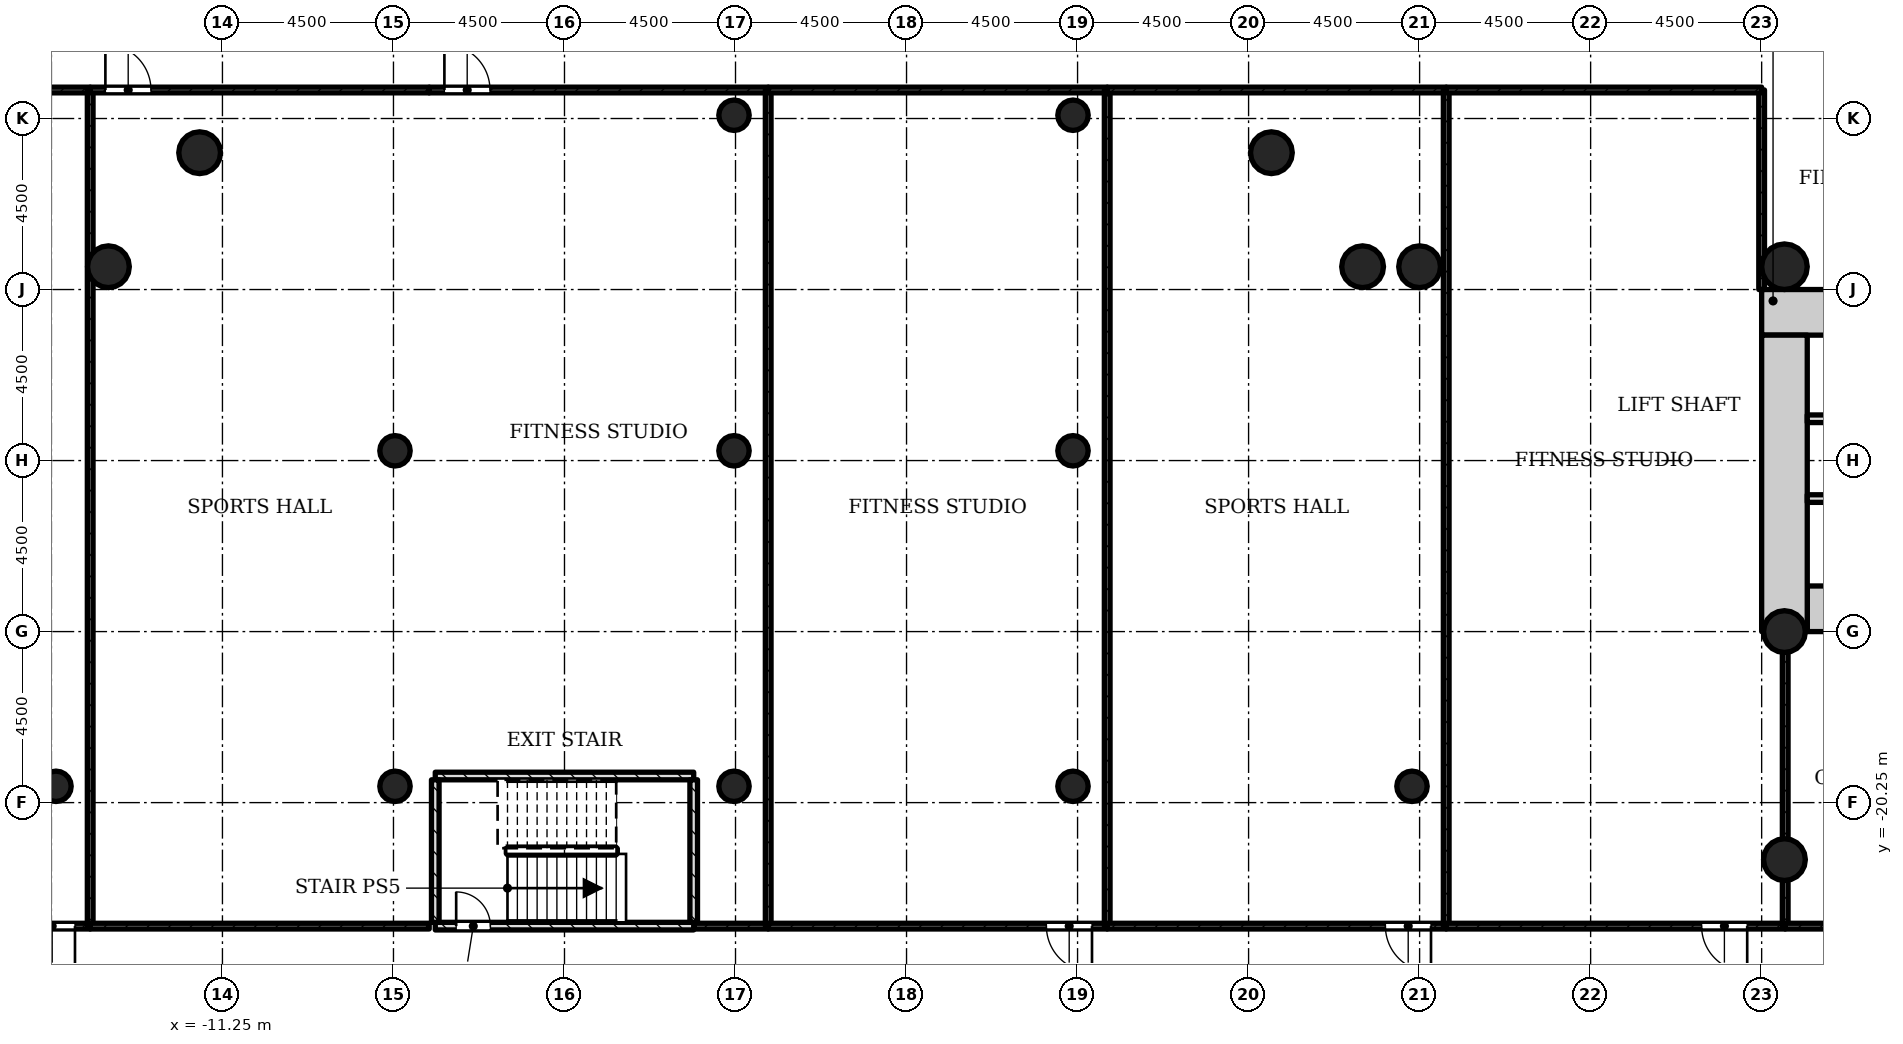
"""IFC4 building model, lengths in metres.
Left out: names, types, materials, properties, quantities, classifications, styles, units other than length and angle.
Written with IfcOpenShell. Run it as: python <this file> out.ifc"""

import sys

from ifc_helpers import new_model, si_unit, direction, frame, frame_2d, origin, origin_2d, place, context, subcontext, project, spatial, rectangle, hollow_circle, extrude, element, fill, save


model = new_model("IFC4")
c1 = context("Model", 3, precision=1e-05, world=origin(), true_north=direction((0.0, 1.0)))
c2 = subcontext(c1, "Body", "Model", "MODEL_VIEW")
j1 = project(units=[si_unit("LENGTHUNIT", "METRE"), si_unit("PLANEANGLEUNIT", "RADIAN")], contexts=[c1])
p1 = place(None, origin())
s1 = spatial("IfcSite", under=j1, at=p1, CompositionType="ELEMENT")
p2 = place(p1, origin())
s2 = spatial("IfcBuilding", under=s1, at=p2, CompositionType="ELEMENT")
p3 = place(p2, frame((0.0, 0.0, 15.5)))
s3 = spatial("IfcBuildingStorey", under=s2, at=p3, CompositionType="ELEMENT", Elevation=15.5)
p4 = place(p3, frame((30.45, -15.15, 0.0), z_axis=(0.0, 0.0, 1.0), x_axis=(1.0, 0.0, 0.0)))
e1 = element("IfcWall", 1, at=p4, inside=s3, PredefinedType="SHEAR", context=c2, shape_type="SweptSolid", body=[
    extrude(rectangle(XDim=12.3, YDim=1.2, at=frame_2d((6.15, 0.0))), origin(), (0.0, 0.0, 1.0), 4.5),
])
p5 = place(p4, frame((4.65, 0.0, 0.0)))
e2 = element("IfcOpeningElement", 2, at=p5, cuts=e1, PredefinedType="OPENING", context=c2, shape_type="SweptSolid", body=[
    extrude(rectangle(XDim=1.8, YDim=2.1, at=frame_2d((0.9, 1.05))), frame((0.0, 0.61, 0.0), z_axis=(0.0, -1.0, 0.0), x_axis=(1.0, 0.0, 0.0)), (0.0, 0.0, 1.0), 1.22),
])
p6 = place(p3, frame((41.55, -7.35, 0.0), z_axis=(0.0, 0.0, 1.0), x_axis=(-1.0, 0.0, 0.0)))
e3 = element("IfcWall", 3, at=p6, inside=s3, PredefinedType="SHEAR", context=c2, shape_type="SweptSolid", body=[
    extrude(rectangle(XDim=12.3, YDim=1.2, at=frame_2d((6.15, 0.0))), origin(), (0.0, 0.0, 1.0), 4.5),
])
p7 = place(p6, frame((4.65, 0.0, 0.0)))
e4 = element("IfcOpeningElement", 4, at=p7, cuts=e3, PredefinedType="OPENING", context=c2, shape_type="SweptSolid", body=[
    extrude(rectangle(XDim=1.8, YDim=2.1, at=frame_2d((0.9, 1.05))), frame((0.0, 0.61, 0.0), z_axis=(0.0, -1.0, 0.0), x_axis=(1.0, 0.0, 0.0)), (0.0, 0.0, 1.0), 1.22),
])
p8 = place(p3, frame((29.85, -7.95, 0.0), z_axis=(0.0, 0.0, 1.0), x_axis=(0.0, -1.0, 0.0)))
e5 = element("IfcWall", 5, at=p8, inside=s3, PredefinedType="SHEAR", context=c2, shape_type="SweptSolid", body=[
    extrude(rectangle(XDim=7.8, YDim=1.2, at=frame_2d((3.9, 0.0))), origin(), (0.0, 0.0, 1.0), 4.5),
])
for number, where, z_axis, x_axis in (
    (6, (-14.25, -6.15, 0.0), (0.0, 0.0, 1.0), (1.0, 0.0, 0.0)),
    (7, (-11.85, -3.15, 0.0), (0.0, 0.0, 1.0), (1.0, 0.0, 0.0)),
    (8, (20.25, -6.15, 0.0), (0.0, 0.0, 1.0), (1.0, 0.0, 0.0)),
    (9, (18.75, -6.15, 0.0), (0.0, 0.0, 1.0), (1.0, 0.0, 0.0)),
    (10, (16.35, -3.15, 0.0), (0.0, 0.0, 1.0), (1.0, 0.0, 0.0)),
    (11, (29.85, -15.75, 0.0), (0.0, 0.0, 1.0), (1.0, 0.0, 0.0)),
    (12, (29.85, -21.75, 0.0), (0.0, 0.0, 1.0), (1.0, 0.0, 0.0)),
):
    element("IfcColumn", number, at=place(p3, frame(where, z_axis=z_axis, x_axis=x_axis)), inside=s3, PredefinedType="COLUMN", context=c2, shape_type="SweptSolid", body=[
        extrude(hollow_circle(Radius=0.55, WallThickness=0.04, at=origin_2d()), origin(), (0.0, 0.0, 1.0), 4.5),
    ])
p9 = place(p3, frame((29.85, -6.15, 0.0), z_axis=(0.0, 0.0, 1.0), x_axis=(1.0, 0.0, 0.0)))
e13 = element("IfcColumn", 13, at=p9, inside=s3, PredefinedType="COLUMN", context=c2, shape_type="SweptSolid", body=[
    extrude(hollow_circle(Radius=0.6, WallThickness=0.045, at=origin_2d()), origin(), (0.0, 0.0, 1.0), 4.5),
])
for number, where, z_axis, x_axis in (
    (14, (-15.63, -19.821, 0.0), (0.0, 0.0, 1.0), (1.0, 0.0, 0.0)),
    (15, (-6.71, -19.821, 0.0), (0.0, 0.0, 1.0), (1.0, 0.0, 0.0)),
    (16, (2.21, -19.821, 0.0), (0.0, 0.0, 1.0), (1.0, 0.0, 0.0)),
    (17, (11.13, -19.821, 0.0), (0.0, 0.0, 1.0), (1.0, 0.0, 0.0)),
    (18, (20.05, -19.821, 0.0), (0.0, 0.0, 1.0), (1.0, 0.0, 0.0)),
    (19, (-6.71, -10.993, 0.0), (0.0, 0.0, 1.0), (1.0, 0.0, 0.0)),
    (20, (2.21, -10.993, 0.0), (0.0, 0.0, 1.0), (1.0, 0.0, 0.0)),
    (21, (11.13, -10.993, 0.0), (0.0, 0.0, 1.0), (1.0, 0.0, 0.0)),
    (22, (2.21, -2.164, 0.0), (0.0, 0.0, 1.0), (1.0, 0.0, 0.0)),
    (23, (11.13, -2.164, 0.0), (0.0, 0.0, 1.0), (1.0, 0.0, 0.0)),
):
    element("IfcColumn", number, at=place(p3, frame(where, z_axis=z_axis, x_axis=x_axis)), inside=s3, PredefinedType="COLUMN", context=c2, shape_type="SweptSolid", body=[
        extrude(hollow_circle(Radius=0.4, WallThickness=0.028, at=origin_2d()), origin(), (0.0, 0.0, 1.0), 4.5),
    ])
p10 = place(p3, frame((-20.25, -1.5, 0.0), z_axis=(0.0, 0.0, 1.0), x_axis=(1.0, 0.0, 0.0)))
e24 = element("IfcWall", 24, at=p10, inside=s3, PredefinedType="PARTITIONING", context=c2, shape_type="SweptSolid", body=[
    extrude(rectangle(XDim=5.52, YDim=0.15, at=frame_2d((2.76, 0.0))), origin(), (0.0, 0.0, 1.0), 4.08),
])
p11 = place(p3, frame((-14.73, -23.5, 0.0), z_axis=(0.0, 0.0, 1.0), x_axis=(-1.0, 0.0, 0.0)))
e25 = element("IfcWall", 25, at=p11, inside=s3, PredefinedType="PARTITIONING", context=c2, shape_type="SweptSolid", body=[
    extrude(rectangle(XDim=8.92, YDim=0.15, at=frame_2d((4.46, 0.0))), origin(), (0.0, 0.0, 1.0), 4.08),
])
p12 = place(p11, frame((0.4, 0.0, 0.0)))
e26 = element("IfcOpeningElement", 26, at=p12, cuts=e25, PredefinedType="OPENING", context=c2, shape_type="SweptSolid", body=[
    extrude(rectangle(XDim=1.2, YDim=2.1, at=frame_2d((0.6, 1.05))), frame((0.0, 0.085, 0.0), z_axis=(0.0, -1.0, 0.0), x_axis=(1.0, 0.0, 0.0)), (0.0, 0.0, 1.0), 0.17),
])
p13 = place(p3, frame((-14.73, -1.5, 0.0), z_axis=(0.0, 0.0, 1.0), x_axis=(0.0, -1.0, 0.0)))
e27 = element("IfcWall", 27, at=p13, inside=s3, PredefinedType="PARTITIONING", context=c2, shape_type="SweptSolid", body=[
    extrude(rectangle(XDim=22.0, YDim=0.15, at=frame_2d((11.0, 0.0))), origin(), (0.0, 0.0, 1.0), 4.08),
])
p14 = place(p3, frame((-14.73, -1.5, 0.0), z_axis=(0.0, 0.0, 1.0), x_axis=(1.0, 0.0, 0.0)))
e28 = element("IfcWall", 28, at=p14, inside=s3, PredefinedType="PARTITIONING", context=c2, shape_type="SweptSolid", body=[
    extrude(rectangle(XDim=8.92, YDim=0.15, at=frame_2d((4.46, 0.0))), origin(), (0.0, 0.0, 1.0), 4.08),
])
p15 = place(p14, frame((0.4, 0.0, 0.0)))
e29 = element("IfcOpeningElement", 29, at=p15, cuts=e28, PredefinedType="OPENING", context=c2, shape_type="SweptSolid", body=[
    extrude(rectangle(XDim=1.2, YDim=2.1, at=frame_2d((0.6, 1.05))), frame((0.0, 0.085, 0.0), z_axis=(0.0, -1.0, 0.0), x_axis=(1.0, 0.0, 0.0)), (0.0, 0.0, 1.0), 0.17),
])
p16 = place(p3, frame((-5.81, -23.5, 0.0), z_axis=(0.0, 0.0, 1.0), x_axis=(-1.0, 0.0, 0.0)))
e30 = element("IfcWall", 30, at=p16, inside=s3, PredefinedType="PARTITIONING", context=c2, shape_type="SweptSolid", body=[
    extrude(rectangle(XDim=8.92, YDim=0.15, at=frame_2d((4.46, 0.0))), origin(), (0.0, 0.0, 1.0), 4.08),
])
p17 = place(p3, frame((-5.65, -23.5, 0.0), z_axis=(0.0, 0.0, 1.0), x_axis=(1.0, 0.0, 0.0)))
e31 = element("IfcWall", 31, at=p17, inside=s3, PredefinedType="SHEAR", context=c2, shape_type="SweptSolid", body=[
    extrude(rectangle(XDim=6.8, YDim=0.2, at=frame_2d((3.4, 0.0))), origin(), (0.0, 0.0, 1.0), 4.08),
])
p18 = place(p17, frame((0.55, 0.0, 0.0)))
e32 = element("IfcOpeningElement", 32, at=p18, cuts=e31, PredefinedType="OPENING", context=c2, shape_type="SweptSolid", body=[
    extrude(rectangle(XDim=0.9, YDim=2.1, at=frame_2d((0.45, 1.05))), frame((0.0, 0.11, 0.0), z_axis=(0.0, -1.0, 0.0), x_axis=(1.0, 0.0, 0.0)), (0.0, 0.0, 1.0), 0.22),
])
p19 = place(p3, frame((-5.65, -19.55, 0.0), z_axis=(0.0, 0.0, 1.0), x_axis=(1.0, 0.0, 0.0)))
e33 = element("IfcWall", 33, at=p19, inside=s3, PredefinedType="SHEAR", context=c2, shape_type="SweptSolid", body=[
    extrude(rectangle(XDim=6.8, YDim=0.2, at=frame_2d((3.4, 0.0))), origin(), (0.0, 0.0, 1.0), 4.08),
])
for number, where, z_axis, x_axis in (
    (34, (-5.65, -23.4, 0.0), (0.0, 0.0, 1.0), (0.0, 1.0, 0.0)),
    (35, (1.15, -23.4, 0.0), (0.0, 0.0, 1.0), (0.0, 1.0, 0.0)),
):
    element("IfcWall", number, at=place(p3, frame(where, z_axis=z_axis, x_axis=x_axis)), inside=s3, PredefinedType="SHEAR", context=c2, shape_type="SweptSolid", body=[
        extrude(rectangle(XDim=3.75, YDim=0.2, at=frame_2d((1.875, 0.0))), origin(), (0.0, 0.0, 1.0), 4.08),
    ])
for number, where, z_axis, x_axis in (
    (36, (30.45, -10.15, 0.0), (0.0, 0.0, 1.0), (1.0, 0.0, 0.0)),
    (37, (30.45, -12.25, 0.0), (0.0, 0.0, 1.0), (1.0, 0.0, 0.0)),
):
    element("IfcWall", number, at=place(p3, frame(where, z_axis=z_axis, x_axis=x_axis)), inside=s3, PredefinedType="SOLIDWALL", context=c2, shape_type="SweptSolid", body=[
        extrude(rectangle(XDim=3.65, YDim=0.2, at=frame_2d((1.825, 0.0))), origin(), (0.0, 0.0, 1.0), 4.08),
    ])
p20 = place(p3, frame((-5.81, -1.5, 0.0), z_axis=(0.0, 0.0, 1.0), x_axis=(1.0, 0.0, 0.0)))
e38 = element("IfcWall", 38, at=p20, inside=s3, PredefinedType="PARTITIONING", context=c2, shape_type="SweptSolid", body=[
    extrude(rectangle(XDim=8.92, YDim=0.15, at=frame_2d((4.46, 0.0))), origin(), (0.0, 0.0, 1.0), 4.08),
])
p21 = place(p20, frame((0.4, 0.0, 0.0)))
e39 = element("IfcOpeningElement", 39, at=p21, cuts=e38, PredefinedType="OPENING", context=c2, shape_type="SweptSolid", body=[
    extrude(rectangle(XDim=1.2, YDim=2.1, at=frame_2d((0.6, 1.05))), frame((0.0, 0.085, 0.0), z_axis=(0.0, -1.0, 0.0), x_axis=(1.0, 0.0, 0.0)), (0.0, 0.0, 1.0), 0.17),
])
p22 = place(p3, frame((3.11, -23.5, 0.0), z_axis=(0.0, 0.0, 1.0), x_axis=(-1.0, 0.0, 0.0)))
e40 = element("IfcWall", 40, at=p22, inside=s3, PredefinedType="PARTITIONING", context=c2, shape_type="SweptSolid", body=[
    extrude(rectangle(XDim=1.96, YDim=0.15, at=frame_2d((0.98, 0.0))), origin(), (0.0, 0.0, 1.0), 4.08),
])
p23 = place(p3, frame((3.11, -1.5, 0.0), z_axis=(0.0, 0.0, 1.0), x_axis=(0.0, -1.0, 0.0)))
e41 = element("IfcWall", 41, at=p23, inside=s3, PredefinedType="PARTITIONING", context=c2, shape_type="SweptSolid", body=[
    extrude(rectangle(XDim=22.0, YDim=0.15, at=frame_2d((11.0, 0.0))), origin(), (0.0, 0.0, 1.0), 4.08),
])
p24 = place(p3, frame((12.03, -23.5, 0.0), z_axis=(0.0, 0.0, 1.0), x_axis=(-1.0, 0.0, 0.0)))
e42 = element("IfcWall", 42, at=p24, inside=s3, PredefinedType="PARTITIONING", context=c2, shape_type="SweptSolid", body=[
    extrude(rectangle(XDim=8.92, YDim=0.15, at=frame_2d((4.46, 0.0))), origin(), (0.0, 0.0, 1.0), 4.08),
])
p25 = place(p24, frame((0.4, 0.0, 0.0)))
e43 = element("IfcOpeningElement", 43, at=p25, cuts=e42, PredefinedType="OPENING", context=c2, shape_type="SweptSolid", body=[
    extrude(rectangle(XDim=1.2, YDim=2.1, at=frame_2d((0.6, 1.05))), frame((0.0, 0.085, 0.0), z_axis=(0.0, -1.0, 0.0), x_axis=(1.0, 0.0, 0.0)), (0.0, 0.0, 1.0), 0.17),
])
p26 = place(p3, frame((3.11, -1.5, 0.0), z_axis=(0.0, 0.0, 1.0), x_axis=(1.0, 0.0, 0.0)))
e44 = element("IfcWall", 44, at=p26, inside=s3, PredefinedType="PARTITIONING", context=c2, shape_type="SweptSolid", body=[
    extrude(rectangle(XDim=8.92, YDim=0.15, at=frame_2d((4.46, 0.0))), origin(), (0.0, 0.0, 1.0), 4.08),
])
p27 = place(p3, frame((12.03, -1.5, 0.0), z_axis=(0.0, 0.0, 1.0), x_axis=(0.0, -1.0, 0.0)))
e45 = element("IfcWall", 45, at=p27, inside=s3, PredefinedType="PARTITIONING", context=c2, shape_type="SweptSolid", body=[
    extrude(rectangle(XDim=22.0, YDim=0.15, at=frame_2d((11.0, 0.0))), origin(), (0.0, 0.0, 1.0), 4.08),
])
p28 = place(p3, frame((20.95, -23.5, 0.0), z_axis=(0.0, 0.0, 1.0), x_axis=(-1.0, 0.0, 0.0)))
e46 = element("IfcWall", 46, at=p28, inside=s3, PredefinedType="PARTITIONING", context=c2, shape_type="SweptSolid", body=[
    extrude(rectangle(XDim=8.92, YDim=0.15, at=frame_2d((4.46, 0.0))), origin(), (0.0, 0.0, 1.0), 4.08),
])
p29 = place(p28, frame((0.4, 0.0, 0.0)))
e47 = element("IfcOpeningElement", 47, at=p29, cuts=e46, PredefinedType="OPENING", context=c2, shape_type="SweptSolid", body=[
    extrude(rectangle(XDim=1.2, YDim=2.1, at=frame_2d((0.6, 1.05))), frame((0.0, 0.085, 0.0), z_axis=(0.0, -1.0, 0.0), x_axis=(1.0, 0.0, 0.0)), (0.0, 0.0, 1.0), 0.17),
])
p30 = place(p3, frame((12.03, -1.5, 0.0), z_axis=(0.0, 0.0, 1.0), x_axis=(1.0, 0.0, 0.0)))
e48 = element("IfcWall", 48, at=p30, inside=s3, PredefinedType="PARTITIONING", context=c2, shape_type="SweptSolid", body=[
    extrude(rectangle(XDim=8.92, YDim=0.15, at=frame_2d((4.46, 0.0))), origin(), (0.0, 0.0, 1.0), 4.08),
])
p31 = place(p3, frame((20.95, -1.5, 0.0), z_axis=(0.0, 0.0, 1.0), x_axis=(0.0, -1.0, 0.0)))
e49 = element("IfcWall", 49, at=p31, inside=s3, PredefinedType="PARTITIONING", context=c2, shape_type="SweptSolid", body=[
    extrude(rectangle(XDim=22.0, YDim=0.15, at=frame_2d((11.0, 0.0))), origin(), (0.0, 0.0, 1.0), 4.08),
])
p32 = place(p3, frame((29.25, -1.5, 0.0), z_axis=(0.0, 0.0, 1.0), x_axis=(0.0, -1.0, 0.0)))
e50 = element("IfcWall", 50, at=p32, inside=s3, PredefinedType="PARTITIONING", context=c2, shape_type="SweptSolid", body=[
    extrude(rectangle(XDim=5.25, YDim=0.15, at=frame_2d((2.625, 0.0))), origin(), (0.0, 0.0, 1.0), 4.08),
])
p33 = place(p3, frame((29.87, -23.5, 0.0), z_axis=(0.0, 0.0, 1.0), x_axis=(-1.0, 0.0, 0.0)))
e51 = element("IfcWall", 51, at=p33, inside=s3, PredefinedType="PARTITIONING", context=c2, shape_type="SweptSolid", body=[
    extrude(rectangle(XDim=8.92, YDim=0.15, at=frame_2d((4.46, 0.0))), origin(), (0.0, 0.0, 1.0), 4.08),
])
p34 = place(p33, frame((1.0, 0.0, 0.0)))
e52 = element("IfcOpeningElement", 52, at=p34, cuts=e51, PredefinedType="OPENING", context=c2, shape_type="SweptSolid", body=[
    extrude(rectangle(XDim=1.2, YDim=2.1, at=frame_2d((0.6, 1.05))), frame((0.0, 0.085, 0.0), z_axis=(0.0, -1.0, 0.0), x_axis=(1.0, 0.0, 0.0)), (0.0, 0.0, 1.0), 0.17),
])
p35 = place(p3, frame((20.95, -1.5, 0.0), z_axis=(0.0, 0.0, 1.0), x_axis=(1.0, 0.0, 0.0)))
e53 = element("IfcWall", 53, at=p35, inside=s3, PredefinedType="PARTITIONING", context=c2, shape_type="SweptSolid", body=[
    extrude(rectangle(XDim=8.3, YDim=0.15, at=frame_2d((4.15, 0.0))), origin(), (0.0, 0.0, 1.0), 4.08),
])
p36 = place(p3, frame((29.87, -15.75, 0.0), z_axis=(0.0, 0.0, 1.0), x_axis=(0.0, -1.0, 0.0)))
e54 = element("IfcWall", 54, at=p36, inside=s3, PredefinedType="PARTITIONING", context=c2, shape_type="SweptSolid", body=[
    extrude(rectangle(XDim=7.75, YDim=0.15, at=frame_2d((3.875, 0.0))), origin(), (0.0, 0.0, 1.0), 4.08),
])
p37 = place(p3, frame((34.5, -23.5, 0.0), z_axis=(0.0, 0.0, 1.0), x_axis=(-1.0, 0.0, 0.0)))
e55 = element("IfcWall", 55, at=p37, inside=s3, PredefinedType="PARTITIONING", context=c2, shape_type="SweptSolid", body=[
    extrude(rectangle(XDim=4.63, YDim=0.15, at=frame_2d((2.315, 0.0))), origin(), (0.0, 0.0, 1.0), 4.08),
])
p38 = place(p12, origin())
e56 = element("IfcDoor", 56, at=p38, inside=s3, OperationType="SINGLE_SWING_RIGHT", PredefinedType="DOOR", context=c2, shape_type="SweptSolid", body=[
    extrude(rectangle(XDim=1.2, YDim=2.1, at=frame_2d((0.6, 1.05))), frame((0.0, 0.025, 0.0), z_axis=(0.0, -1.0, 0.0), x_axis=(1.0, 0.0, 0.0)), (0.0, 0.0, 1.0), 0.05),
])
fill(e26, e56)
p39 = place(p15, origin())
e57 = element("IfcDoor", 57, at=p39, inside=s3, OperationType="SINGLE_SWING_RIGHT", PredefinedType="DOOR", context=c2, shape_type="SweptSolid", body=[
    extrude(rectangle(XDim=1.2, YDim=2.1, at=frame_2d((0.6, 1.05))), frame((0.0, 0.025, 0.0), z_axis=(0.0, -1.0, 0.0), x_axis=(1.0, 0.0, 0.0)), (0.0, 0.0, 1.0), 0.05),
])
fill(e29, e57)
p40 = place(p18, origin())
e58 = element("IfcDoor", 58, at=p40, inside=s3, OperationType="SINGLE_SWING_RIGHT", PredefinedType="DOOR", context=c2, shape_type="SweptSolid", body=[
    extrude(rectangle(XDim=0.9, YDim=2.1, at=frame_2d((0.45, 1.05))), frame((0.0, 0.025, 0.0), z_axis=(0.0, -1.0, 0.0), x_axis=(1.0, 0.0, 0.0)), (0.0, 0.0, 1.0), 0.05),
])
fill(e32, e58)
p41 = place(p21, origin())
e59 = element("IfcDoor", 59, at=p41, inside=s3, OperationType="SINGLE_SWING_RIGHT", PredefinedType="DOOR", context=c2, shape_type="SweptSolid", body=[
    extrude(rectangle(XDim=1.2, YDim=2.1, at=frame_2d((0.6, 1.05))), frame((0.0, 0.025, 0.0), z_axis=(0.0, -1.0, 0.0), x_axis=(1.0, 0.0, 0.0)), (0.0, 0.0, 1.0), 0.05),
])
fill(e39, e59)
p42 = place(p25, origin())
e60 = element("IfcDoor", 60, at=p42, inside=s3, OperationType="SINGLE_SWING_RIGHT", PredefinedType="DOOR", context=c2, shape_type="SweptSolid", body=[
    extrude(rectangle(XDim=1.2, YDim=2.1, at=frame_2d((0.6, 1.05))), frame((0.0, 0.025, 0.0), z_axis=(0.0, -1.0, 0.0), x_axis=(1.0, 0.0, 0.0)), (0.0, 0.0, 1.0), 0.05),
])
fill(e43, e60)
p43 = place(p29, origin())
e61 = element("IfcDoor", 61, at=p43, inside=s3, OperationType="SINGLE_SWING_RIGHT", PredefinedType="DOOR", context=c2, shape_type="SweptSolid", body=[
    extrude(rectangle(XDim=1.2, YDim=2.1, at=frame_2d((0.6, 1.05))), frame((0.0, 0.025, 0.0), z_axis=(0.0, -1.0, 0.0), x_axis=(1.0, 0.0, 0.0)), (0.0, 0.0, 1.0), 0.05),
])
fill(e47, e61)
p44 = place(p34, origin())
e62 = element("IfcDoor", 62, at=p44, inside=s3, OperationType="SINGLE_SWING_RIGHT", PredefinedType="DOOR", context=c2, shape_type="SweptSolid", body=[
    extrude(rectangle(XDim=1.2, YDim=2.1, at=frame_2d((0.6, 1.05))), frame((0.0, 0.025, 0.0), z_axis=(0.0, -1.0, 0.0), x_axis=(1.0, 0.0, 0.0)), (0.0, 0.0, 1.0), 0.05),
])
fill(e52, e62)
save(model, sys.argv[1])
